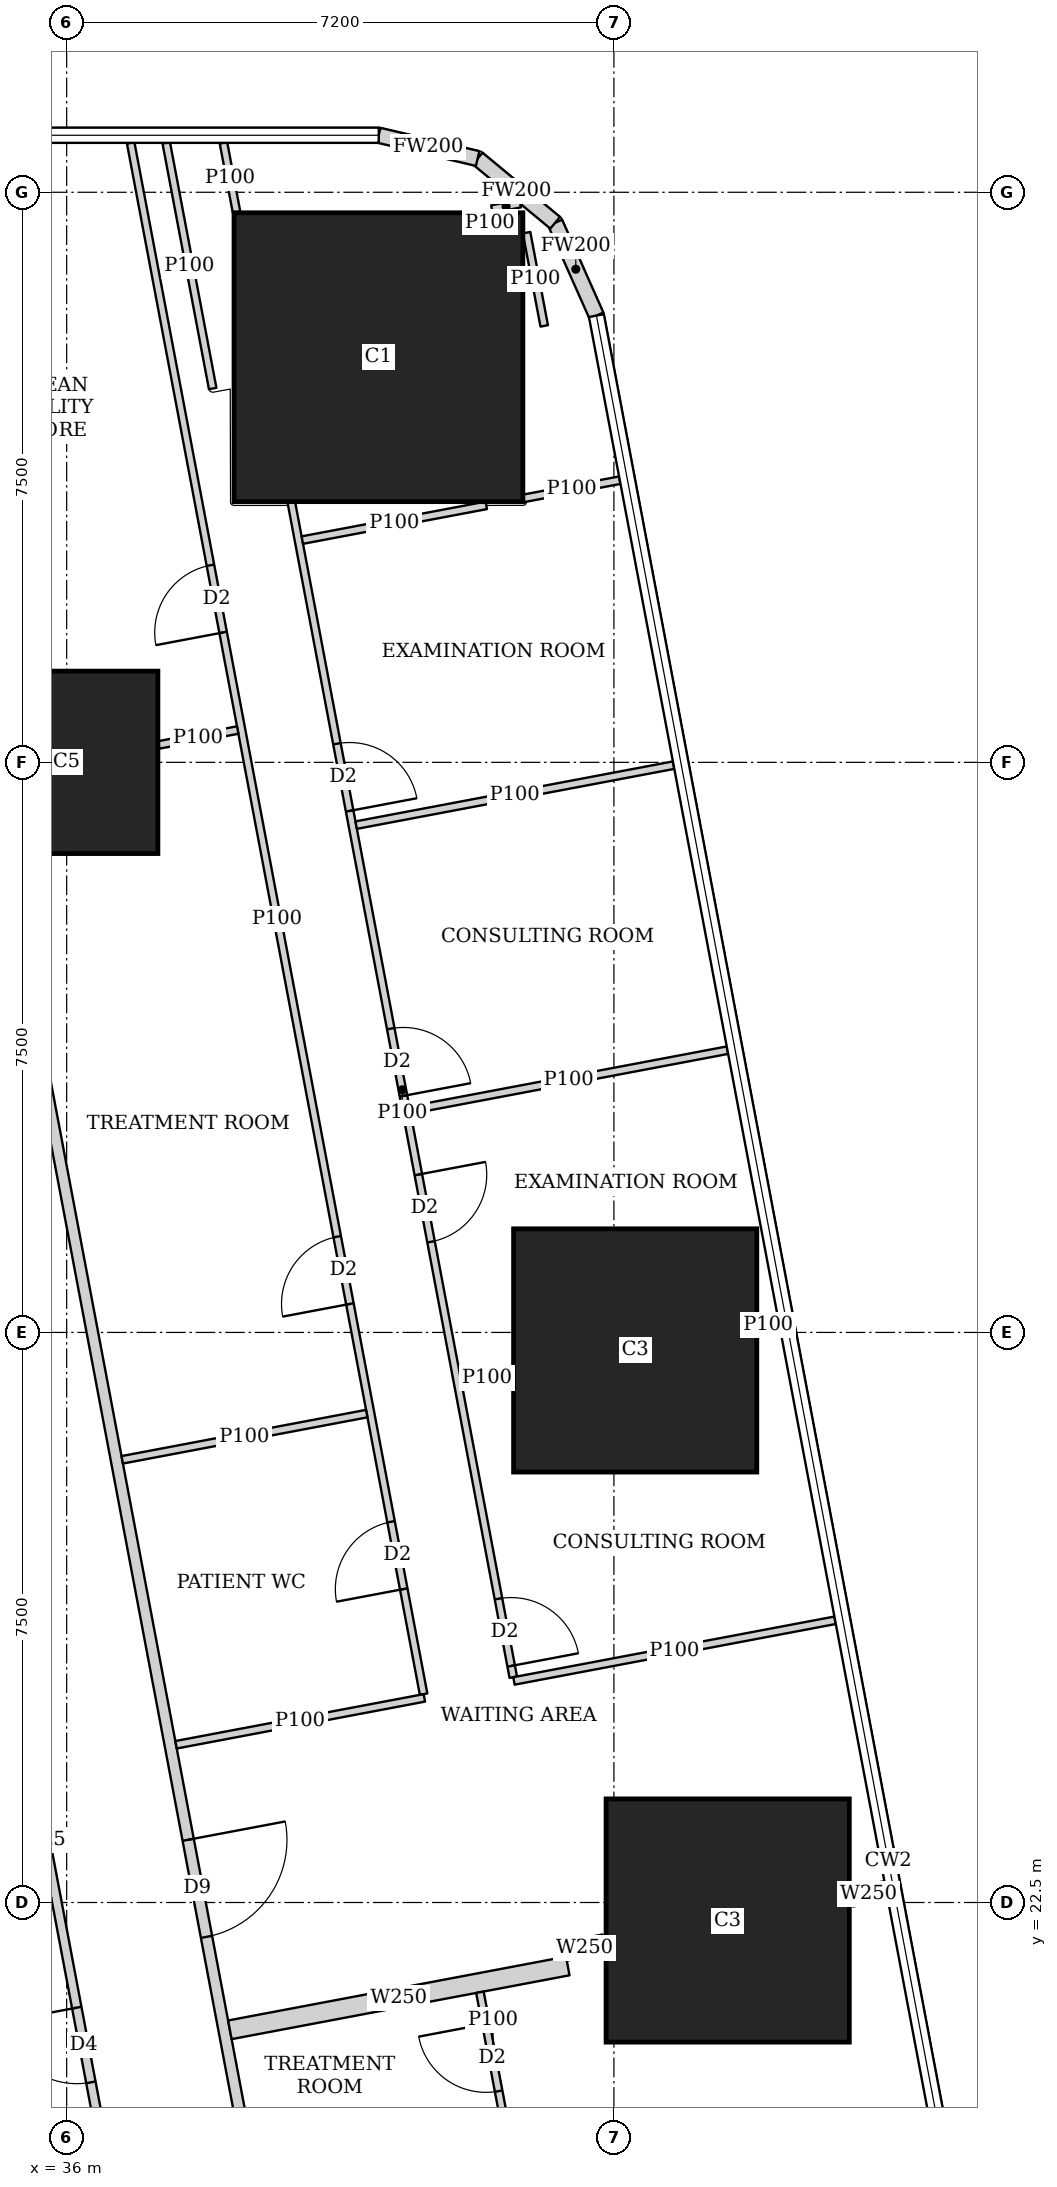
"""IFC4 building model, lengths in metres.
Left out: names, types, materials, properties, quantities, classifications, styles, units other than length and angle.
Written with IfcOpenShell. Run it as: python <this file> out.ifc"""

import sys

from ifc_helpers import new_model, si_unit, direction, frame, frame_2d, origin, origin_2d, place, context, subcontext, project, spatial, rectangle, extrude, element, fill, save


model = new_model("IFC4")
c1 = context("Model", 3, precision=1e-05, world=origin(), true_north=direction((0.0, 1.0)))
c2 = subcontext(c1, "Body", "Model", "MODEL_VIEW")
j1 = project(units=[si_unit("LENGTHUNIT", "METRE"), si_unit("PLANEANGLEUNIT", "RADIAN")], contexts=[c1])
p1 = place(None, origin())
s1 = spatial("IfcSite", under=j1, at=p1, CompositionType="ELEMENT")
p2 = place(p1, origin())
s2 = spatial("IfcBuilding", under=s1, at=p2, CompositionType="ELEMENT")
p3 = place(p2, frame((0.0, 0.0, 5.6)))
s3 = spatial("IfcBuildingStorey", under=s2, at=p3, CompositionType="ELEMENT", Elevation=5.6)
for number, where, z_axis, x_axis in (
    (1, (44.697, 22.263, 0.0), (0.0, 0.0, 1.0), (1.0, 0.0, 0.0)),
    (2, (43.48, 29.763, 0.0), (0.0, 0.0, 1.0), (1.0, 0.0, 0.0)),
):
    element("IfcColumn", number, at=place(p3, frame(where, z_axis=z_axis, x_axis=x_axis)), inside=s3, PredefinedType="COLUMN", context=c2, shape_type="SweptSolid", body=[
        extrude(rectangle(XDim=3.2, YDim=3.2, at=origin_2d()), origin(), (0.0, 0.0, 1.0), 4.5),
    ])
p4 = place(p3, frame((36.0, 37.5, 0.0), z_axis=(0.0, 0.0, 1.0), x_axis=(1.0, 0.0, 0.0)))
e3 = element("IfcColumn", 3, at=p4, inside=s3, PredefinedType="COLUMN", context=c2, shape_type="SweptSolid", body=[
    extrude(rectangle(XDim=2.4, YDim=2.4, at=origin_2d()), origin(), (0.0, 0.0, 1.0), 4.5),
])
p5 = place(p3, frame((40.102, 42.83, 0.0), z_axis=(0.0, 0.0, 1.0), x_axis=(1.0, 0.0, 0.0)))
e4 = element("IfcColumn", 4, at=p5, inside=s3, PredefinedType="COLUMN", context=c2, shape_type="SweptSolid", body=[
    extrude(rectangle(XDim=3.8, YDim=3.8, at=origin_2d()), origin(), (0.0, 0.0, 1.0), 4.5),
])
p6 = place(p3, frame((42.97, 43.377, 0.0), z_axis=(0.0, 0.0, 1.0), x_axis=(-0.406002956633, 0.913871762998, 0.0)))
e5 = element("IfcWall", 5, at=p6, inside=s3, PredefinedType="SOLIDWALL", context=c2, shape_type="SweptSolid", body=[
    extrude(rectangle(XDim=1.337, YDim=0.2, at=frame_2d((0.669, 0.0))), origin(), (0.0, 0.0, 1.0), 4.2),
])
p7 = place(p3, frame((42.427, 44.599, 0.0), z_axis=(0.0, 0.0, 1.0), x_axis=(-0.770091412544, 0.637933551655, 0.0)))
e6 = element("IfcWall", 6, at=p7, inside=s3, PredefinedType="SOLIDWALL", context=c2, shape_type="SweptSolid", body=[
    extrude(rectangle(XDim=1.324, YDim=0.2, at=frame_2d((0.662, 0.0))), origin(), (0.0, 0.0, 1.0), 4.2),
])
p8 = place(p3, frame((41.407, 45.444, 0.0), z_axis=(0.0, 0.0, 1.0), x_axis=(-0.973453091607, 0.228886606077, 0.0)))
e7 = element("IfcWall", 7, at=p8, inside=s3, PredefinedType="SOLIDWALL", context=c2, shape_type="SweptSolid", body=[
    extrude(rectangle(XDim=1.336, YDim=0.2, at=frame_2d((0.668, 0.0))), origin(), (0.0, 0.0, 1.0), 4.2),
])
p9 = place(p3, frame((35.151, 36.285, 0.0), z_axis=(0.0, 0.0, 1.0), x_axis=(0.18558085056, -0.982628998099, 0.0)))
e8 = element("IfcWall", 8, at=p9, inside=s3, PredefinedType="SOLIDWALL", context=c2, shape_type="SweptSolid", body=[
    extrude(rectangle(XDim=34.352, YDim=0.15, at=frame_2d((17.176, 0.0))), origin(), (0.0, 0.0, 1.0), 2.4),
])
p10 = place(p9, frame((13.189, 0.0, 0.0)))
e9 = element("IfcOpeningElement", 9, at=p10, cuts=e8, PredefinedType="OPENING", context=c2, shape_type="SweptSolid", body=[
    extrude(rectangle(XDim=1.3, YDim=2.1, at=frame_2d((0.65, 1.05))), frame((0.0, 0.085, 0.0), z_axis=(0.0, -1.0, 0.0), x_axis=(1.0, 0.0, 0.0)), (0.0, 0.0, 1.0), 0.17),
])
p11 = place(p9, frame((19.443, 0.0, 0.0)))
e10 = element("IfcOpeningElement", 10, at=p11, cuts=e8, PredefinedType="OPENING", context=c2, shape_type="SweptSolid", body=[
    extrude(rectangle(XDim=1.3, YDim=2.1, at=frame_2d((0.65, 1.05))), frame((0.0, 0.085, 0.0), z_axis=(0.0, -1.0, 0.0), x_axis=(1.0, 0.0, 0.0)), (0.0, 0.0, 1.0), 0.17),
])
p12 = place(p9, frame((25.444, 0.0, 0.0)))
e11 = element("IfcOpeningElement", 11, at=p12, cuts=e8, PredefinedType="OPENING", context=c2, shape_type="SweptSolid", body=[
    extrude(rectangle(XDim=1.3, YDim=2.1, at=frame_2d((0.65, 1.05))), frame((0.0, 0.085, 0.0), z_axis=(0.0, -1.0, 0.0), x_axis=(1.0, 0.0, 0.0)), (0.0, 0.0, 1.0), 0.17),
])
p13 = place(p3, frame((37.921, 42.418, 0.0), z_axis=(0.0, 0.0, 1.0), x_axis=(-0.185713480744, 0.982603940085, 0.0)))
e12 = element("IfcWall", 12, at=p13, inside=s3, PredefinedType="PARTITIONING", context=c2, shape_type="SweptSolid", body=[
    extrude(rectangle(XDim=3.289, YDim=0.1, at=frame_2d((1.645, 0.0))), origin(), (0.0, 0.0, 1.0), 2.4),
])
p14 = place(p3, frame((42.051, 44.469, 0.0), z_axis=(0.0, 0.0, 1.0), x_axis=(0.185728424166, -0.98260111564, 0.0)))
e13 = element("IfcWall", 13, at=p14, inside=s3, PredefinedType="PARTITIONING", context=c2, shape_type="SweptSolid", body=[
    extrude(rectangle(XDim=1.249, YDim=0.1, at=frame_2d((0.625, 0.0))), origin(), (0.0, 0.0, 1.0), 4.2),
])
p15 = place(p3, frame((38.063, 45.65, 0.0), z_axis=(0.0, 0.0, 1.0), x_axis=(0.185288147753, -0.982684233262, 0.0)))
e14 = element("IfcWall", 14, at=p15, inside=s3, PredefinedType="PARTITIONING", context=c2, shape_type="SweptSolid", body=[
    extrude(rectangle(XDim=0.929, YDim=0.1, at=frame_2d((0.464, 0.0))), origin(), (0.0, 0.0, 1.0), 4.2),
])
p16 = place(p3, frame((38.956, 40.92, 0.0), z_axis=(0.0, 0.0, 1.0), x_axis=(0.185636914727, -0.982618408077, 0.0)))
e15 = element("IfcWall", 15, at=p16, inside=s3, PredefinedType="PARTITIONING", context=c2, shape_type="SweptSolid", body=[
    extrude(rectangle(XDim=15.729, YDim=0.1, at=frame_2d((7.865, 0.0))), origin(), (0.0, 0.0, 1.0), 2.6),
])
p17 = place(p16, frame((14.679, 0.0, 0.0)))
e16 = element("IfcOpeningElement", 16, at=p17, cuts=e15, PredefinedType="OPENING", context=c2, shape_type="SweptSolid", body=[
    extrude(rectangle(XDim=0.9, YDim=2.1, at=frame_2d((0.45, 1.05))), frame((0.0, 0.06, 0.0), z_axis=(0.0, -1.0, 0.0), x_axis=(1.0, 0.0, 0.0)), (0.0, 0.0, 1.0), 0.12),
])
p18 = place(p16, frame((9.0, 0.0, 0.0)))
e17 = element("IfcOpeningElement", 17, at=p18, cuts=e15, PredefinedType="OPENING", context=c2, shape_type="SweptSolid", body=[
    extrude(rectangle(XDim=0.9, YDim=2.1, at=frame_2d((0.45, 1.05))), frame((0.0, 0.06, 0.0), z_axis=(0.0, -1.0, 0.0), x_axis=(1.0, 0.0, 0.0)), (0.0, 0.0, 1.0), 0.12),
])
p19 = place(p16, frame((7.046, 0.0, 0.0)))
e18 = element("IfcOpeningElement", 18, at=p19, cuts=e15, PredefinedType="OPENING", context=c2, shape_type="SweptSolid", body=[
    extrude(rectangle(XDim=0.9, YDim=2.1, at=frame_2d((0.45, 1.05))), frame((0.0, 0.06, 0.0), z_axis=(0.0, -1.0, 0.0), x_axis=(1.0, 0.0, 0.0)), (0.0, 0.0, 1.0), 0.12),
])
p20 = place(p16, frame((3.231, 0.0, 0.0)))
e19 = element("IfcOpeningElement", 19, at=p20, cuts=e15, PredefinedType="OPENING", context=c2, shape_type="SweptSolid", body=[
    extrude(rectangle(XDim=0.9, YDim=2.1, at=frame_2d((0.45, 1.05))), frame((0.0, 0.06, 0.0), z_axis=(0.0, -1.0, 0.0), x_axis=(1.0, 0.0, 0.0)), (0.0, 0.0, 1.0), 0.12),
])
p21 = place(p3, frame((36.842, 45.65, 0.0), z_axis=(0.0, 0.0, 1.0), x_axis=(0.185559483963, -0.982633033188, 0.0)))
e20 = element("IfcWall", 20, at=p21, inside=s3, PredefinedType="PARTITIONING", context=c2, shape_type="SweptSolid", body=[
    extrude(rectangle(XDim=20.77, YDim=0.1, at=frame_2d((10.385, 0.0))), origin(), (0.0, 0.0, 1.0), 2.4),
])
p22 = place(p21, frame((18.462, 0.0, 0.0)))
e21 = element("IfcOpeningElement", 21, at=p22, cuts=e20, PredefinedType="OPENING", context=c2, shape_type="SweptSolid", body=[
    extrude(rectangle(XDim=0.9, YDim=2.1, at=frame_2d((0.45, 1.05))), frame((0.0, 0.06, 0.0), z_axis=(0.0, -1.0, 0.0), x_axis=(1.0, 0.0, 0.0)), (0.0, 0.0, 1.0), 0.12),
])
p23 = place(p21, frame((14.645, 0.0, 0.0)))
e22 = element("IfcOpeningElement", 22, at=p23, cuts=e20, PredefinedType="OPENING", context=c2, shape_type="SweptSolid", body=[
    extrude(rectangle(XDim=0.9, YDim=2.1, at=frame_2d((0.45, 1.05))), frame((0.0, 0.06, 0.0), z_axis=(0.0, -1.0, 0.0), x_axis=(1.0, 0.0, 0.0)), (0.0, 0.0, 1.0), 0.12),
])
p24 = place(p21, frame((5.655, 0.0, 0.0)))
e23 = element("IfcOpeningElement", 23, at=p24, cuts=e20, PredefinedType="OPENING", context=c2, shape_type="SweptSolid", body=[
    extrude(rectangle(XDim=0.9, YDim=2.1, at=frame_2d((0.45, 1.05))), frame((0.0, 0.06, 0.0), z_axis=(0.0, -1.0, 0.0), x_axis=(1.0, 0.0, 0.0)), (0.0, 0.0, 1.0), 0.12),
])
p25 = place(p3, frame((41.968, 44.85, 0.0), z_axis=(0.0, 0.0, 1.0), x_axis=(-0.982433858219, -0.186611131032, 0.0)))
e24 = element("IfcWall", 24, at=p25, inside=s3, PredefinedType="PARTITIONING", context=c2, shape_type="SweptSolid", body=[
    extrude(rectangle(XDim=0.381, YDim=0.1, at=frame_2d((0.19, 0.0))), origin(), (0.0, 0.0, 1.0), 4.2),
])
p26 = place(p3, frame((43.277, 41.212, 0.0), z_axis=(0.0, 0.0, 1.0), x_axis=(-0.982617952949, -0.185639323801, 0.0)))
e25 = element("IfcWall", 25, at=p26, inside=s3, PredefinedType="PARTITIONING", context=c2, shape_type="SweptSolid", body=[
    extrude(rectangle(XDim=1.288, YDim=0.1, at=frame_2d((0.644, 0.0))), origin(), (0.0, 0.0, 1.0), 2.4),
])
p27 = place(p3, frame((41.521, 40.881, 0.0), z_axis=(0.0, 0.0, 1.0), x_axis=(-0.982628922785, -0.18558124934, 0.0)))
e26 = element("IfcWall", 26, at=p27, inside=s3, PredefinedType="PARTITIONING", context=c2, shape_type="SweptSolid", body=[
    extrude(rectangle(XDim=2.463, YDim=0.1, at=frame_2d((1.231, 0.0))), origin(), (0.0, 0.0, 1.0), 2.4),
])
p28 = place(p3, frame((43.985, 37.463, 0.0), z_axis=(0.0, 0.0, 1.0), x_axis=(-0.982623519589, -0.185609856287, 0.0)))
e27 = element("IfcWall", 27, at=p28, inside=s3, PredefinedType="PARTITIONING", context=c2, shape_type="SweptSolid", body=[
    extrude(rectangle(XDim=4.25, YDim=0.1, at=frame_2d((2.125, 0.0))), origin(), (0.0, 0.0, 1.0), 2.4),
])
p29 = place(p3, frame((44.693, 33.713, 0.0), z_axis=(0.0, 0.0, 1.0), x_axis=(-0.982615600536, -0.185651775062, 0.0)))
e28 = element("IfcWall", 28, at=p29, inside=s3, PredefinedType="PARTITIONING", context=c2, shape_type="SweptSolid", body=[
    extrude(rectangle(XDim=4.249, YDim=0.1, at=frame_2d((2.125, 0.0))), origin(), (0.0, 0.0, 1.0), 2.4),
])
p30 = place(p3, frame((45.372, 30.121, 0.0), z_axis=(0.0, 0.0, 1.0), x_axis=(-0.982804690287, -0.184648153933, 0.0)))
e29 = element("IfcWall", 29, at=p30, inside=s3, PredefinedType="PARTITIONING", context=c2, shape_type="SweptSolid", body=[
    extrude(rectangle(XDim=0.287, YDim=0.1, at=frame_2d((0.144, 0.0))), origin(), (0.0, 0.0, 1.0), 4.2),
])
p31 = place(p3, frame((41.87, 29.459, 0.0), z_axis=(0.0, 0.0, 1.0), x_axis=(-0.982722777639, -0.185083608972, 0.0)))
e30 = element("IfcWall", 30, at=p31, inside=s3, PredefinedType="PARTITIONING", context=c2, shape_type="SweptSolid", body=[
    extrude(rectangle(XDim=0.686, YDim=0.1, at=frame_2d((0.343, 0.0))), origin(), (0.0, 0.0, 1.0), 2.6),
])
p32 = place(p3, frame((46.11, 26.213, 0.0), z_axis=(0.0, 0.0, 1.0), x_axis=(-0.982633535512, -0.185556823879, 0.0)))
e31 = element("IfcWall", 31, at=p32, inside=s3, PredefinedType="PARTITIONING", context=c2, shape_type="SweptSolid", body=[
    extrude(rectangle(XDim=4.3, YDim=0.1, at=frame_2d((2.15, 0.0))), origin(), (0.0, 0.0, 1.0), 2.4),
])
p33 = place(p3, frame((38.25, 37.925, 0.0), z_axis=(0.0, 0.0, 1.0), x_axis=(-0.982694151031, -0.185235540676, 0.0)))
e32 = element("IfcWall", 32, at=p33, inside=s3, PredefinedType="PARTITIONING", context=c2, shape_type="SweptSolid", body=[
    extrude(rectangle(XDim=1.058, YDim=0.1, at=frame_2d((0.529, 0.0))), origin(), (0.0, 0.0, 1.0), 4.2),
])
p34 = place(p3, frame((39.948, 28.932, 0.0), z_axis=(0.0, 0.0, 1.0), x_axis=(-0.982610347627, -0.185679575441, 0.0)))
e33 = element("IfcWall", 33, at=p34, inside=s3, PredefinedType="PARTITIONING", context=c2, shape_type="SweptSolid", body=[
    extrude(rectangle(XDim=3.274, YDim=0.1, at=frame_2d((1.637, 0.0))), origin(), (0.0, 0.0, 1.0), 2.6),
])
p35 = place(p3, frame((40.706, 25.192, 0.0), z_axis=(0.0, 0.0, 1.0), x_axis=(-0.982633623707, -0.185556356831, 0.0)))
e34 = element("IfcWall", 34, at=p35, inside=s3, PredefinedType="PARTITIONING", context=c2, shape_type="SweptSolid", body=[
    extrude(rectangle(XDim=3.325, YDim=0.1, at=frame_2d((1.663, 0.0))), origin(), (0.0, 0.0, 1.0), 4.2),
])
p36 = place(p3, frame((41.437, 21.319, 0.0), z_axis=(0.0, 0.0, 1.0), x_axis=(0.186029078128, -0.982544239254, 0.0)))
e35 = element("IfcWall", 35, at=p36, inside=s3, PredefinedType="PARTITIONING", context=c2, shape_type="SweptSolid", body=[
    extrude(rectangle(XDim=1.854, YDim=0.1, at=frame_2d((0.927, 0.0))), origin(), (0.0, 0.0, 1.0), 4.2),
])
p37 = place(p36, frame((0.424, 0.0, 0.0)))
e36 = element("IfcOpeningElement", 36, at=p37, cuts=e35, PredefinedType="OPENING", context=c2, shape_type="SweptSolid", body=[
    extrude(rectangle(XDim=0.9, YDim=2.1, at=frame_2d((0.45, 1.05))), frame((0.0, 0.06, 0.0), z_axis=(0.0, -1.0, 0.0), x_axis=(1.0, 0.0, 0.0)), (0.0, 0.0, 1.0), 0.12),
])
p38 = place(p3, frame((46.782, 22.657, 0.0), z_axis=(0.0, 0.0, 1.0), x_axis=(-0.982683117999, -0.185294062504, 0.0)))
e37 = element("IfcWall", 37, at=p38, inside=s3, PredefinedType="SOLIDWALL", context=c2, shape_type="SweptSolid", body=[
    extrude(rectangle(XDim=0.469, YDim=0.25, at=frame_2d((0.234, 0.0))), origin(), (0.0, 0.0, 1.0), 2.4),
])
p39 = place(p3, frame((43.073, 21.956, 0.0), z_axis=(0.0, 0.0, 1.0), x_axis=(-0.982395465615, -0.18681313963, 0.0)))
e38 = element("IfcWall", 38, at=p39, inside=s3, PredefinedType="SOLIDWALL", context=c2, shape_type="SweptSolid", body=[
    extrude(rectangle(XDim=0.525, YDim=0.25, at=frame_2d((0.263, 0.0))), origin(), (0.0, 0.0, 1.0), 2.6),
])
p40 = place(p3, frame((42.593, 21.665, 0.0), z_axis=(0.0, 0.0, 1.0), x_axis=(-0.982612837616, -0.185666398014, 0.0)))
e39 = element("IfcWall", 39, at=p40, inside=s3, PredefinedType="SOLIDWALL", context=c2, shape_type="SweptSolid", body=[
    extrude(rectangle(XDim=4.525, YDim=0.25, at=frame_2d((2.262, 0.0))), origin(), (0.0, 0.0, 1.0), 2.6),
])
p41 = place(p3, frame((37.059, 16.213, 0.0), z_axis=(0.0, 0.0, 1.0), x_axis=(-0.185585225745, 0.982628171785, 0.0)))
e40 = element("IfcWall", 40, at=p41, inside=s3, PredefinedType="PARTITIONING", context=c2, shape_type="SweptSolid", body=[
    extrude(rectangle(XDim=15.072, YDim=0.125, at=frame_2d((7.536, 0.0))), origin(), (0.0, 0.0, 1.0), 2.6),
])
p42 = place(p41, frame((7.221, 0.0, 0.0)))
e41 = element("IfcOpeningElement", 41, at=p42, cuts=e40, PredefinedType="OPENING", context=c2, shape_type="SweptSolid", body=[
    extrude(rectangle(XDim=1.0, YDim=2.1, at=frame_2d((0.5, 1.05))), frame((0.0, 0.073, 0.0), z_axis=(0.0, -1.0, 0.0), x_axis=(1.0, 0.0, 0.0)), (0.0, 0.0, 1.0), 0.145),
])
p43 = place(p41, frame((0.25, 0.0, 0.0)))
e42 = element("IfcOpeningElement", 42, at=p43, cuts=e40, PredefinedType="OPENING", context=c2, shape_type="SweptSolid", body=[
    extrude(rectangle(XDim=1.0, YDim=2.1, at=frame_2d((0.5, 1.05))), frame((0.0, 0.073, 0.0), z_axis=(0.0, -1.0, 0.0), x_axis=(1.0, 0.0, 0.0)), (0.0, 0.0, 1.0), 0.145),
])
p44 = place(p41, frame((3.99, 0.0, 0.0)))
e43 = element("IfcOpeningElement", 43, at=p44, cuts=e40, PredefinedType="OPENING", context=c2, shape_type="SweptSolid", body=[
    extrude(rectangle(XDim=1.0, YDim=2.1, at=frame_2d((0.5, 1.05))), frame((0.0, 0.073, 0.0), z_axis=(0.0, -1.0, 0.0), x_axis=(1.0, 0.0, 0.0)), (0.0, 0.0, 1.0), 0.145),
])
p45 = place(p17, origin())
e44 = element("IfcDoor", 44, at=p45, inside=s3, OperationType="SINGLE_SWING_RIGHT", PredefinedType="DOOR", context=c2, shape_type="SweptSolid", body=[
    extrude(rectangle(XDim=0.9, YDim=2.1, at=frame_2d((0.45, 1.05))), frame((0.0, 0.025, 0.0), z_axis=(0.0, -1.0, 0.0), x_axis=(1.0, 0.0, 0.0)), (0.0, 0.0, 1.0), 0.05),
])
fill(e16, e44)
p46 = place(p18, origin())
e45 = element("IfcDoor", 45, at=p46, inside=s3, OperationType="SINGLE_SWING_LEFT", PredefinedType="DOOR", context=c2, shape_type="SweptSolid", body=[
    extrude(rectangle(XDim=0.9, YDim=2.1, at=frame_2d((0.45, 1.05))), frame((0.0, 0.025, 0.0), z_axis=(0.0, -1.0, 0.0), x_axis=(1.0, 0.0, 0.0)), (0.0, 0.0, 1.0), 0.05),
])
fill(e17, e45)
p47 = place(p19, origin())
e46 = element("IfcDoor", 46, at=p47, inside=s3, OperationType="SINGLE_SWING_RIGHT", PredefinedType="DOOR", context=c2, shape_type="SweptSolid", body=[
    extrude(rectangle(XDim=0.9, YDim=2.1, at=frame_2d((0.45, 1.05))), frame((0.0, 0.025, 0.0), z_axis=(0.0, -1.0, 0.0), x_axis=(1.0, 0.0, 0.0)), (0.0, 0.0, 1.0), 0.05),
])
fill(e18, e46)
p48 = place(p20, origin())
e47 = element("IfcDoor", 47, at=p48, inside=s3, OperationType="SINGLE_SWING_RIGHT", PredefinedType="DOOR", context=c2, shape_type="SweptSolid", body=[
    extrude(rectangle(XDim=0.9, YDim=2.1, at=frame_2d((0.45, 1.05))), frame((0.0, 0.025, 0.0), z_axis=(0.0, -1.0, 0.0), x_axis=(1.0, 0.0, 0.0)), (0.0, 0.0, 1.0), 0.05),
])
fill(e19, e47)
p49 = place(p22, origin())
e48 = element("IfcDoor", 48, at=p49, inside=s3, OperationType="SINGLE_SWING_LEFT", PredefinedType="DOOR", context=c2, shape_type="SweptSolid", body=[
    extrude(rectangle(XDim=0.9, YDim=2.1, at=frame_2d((0.45, 1.05))), frame((0.0, 0.025, 0.0), z_axis=(0.0, -1.0, 0.0), x_axis=(1.0, 0.0, 0.0)), (0.0, 0.0, 1.0), 0.05),
])
fill(e21, e48)
p50 = place(p23, origin())
e49 = element("IfcDoor", 49, at=p50, inside=s3, OperationType="SINGLE_SWING_LEFT", PredefinedType="DOOR", context=c2, shape_type="SweptSolid", body=[
    extrude(rectangle(XDim=0.9, YDim=2.1, at=frame_2d((0.45, 1.05))), frame((0.0, 0.025, 0.0), z_axis=(0.0, -1.0, 0.0), x_axis=(1.0, 0.0, 0.0)), (0.0, 0.0, 1.0), 0.05),
])
fill(e22, e49)
p51 = place(p24, origin())
e50 = element("IfcDoor", 50, at=p51, inside=s3, OperationType="SINGLE_SWING_LEFT", PredefinedType="DOOR", context=c2, shape_type="SweptSolid", body=[
    extrude(rectangle(XDim=0.9, YDim=2.1, at=frame_2d((0.45, 1.05))), frame((0.0, 0.025, 0.0), z_axis=(0.0, -1.0, 0.0), x_axis=(1.0, 0.0, 0.0)), (0.0, 0.0, 1.0), 0.05),
])
fill(e23, e50)
p52 = place(p10, origin())
e51 = element("IfcDoor", 51, at=p52, inside=s3, OperationType="DOUBLE_DOOR_SINGLE_SWING", PredefinedType="DOOR", context=c2, shape_type="SweptSolid", body=[
    extrude(rectangle(XDim=1.3, YDim=2.1, at=frame_2d((0.65, 1.05))), frame((0.0, 0.025, 0.0), z_axis=(0.0, -1.0, 0.0), x_axis=(1.0, 0.0, 0.0)), (0.0, 0.0, 1.0), 0.05),
])
fill(e9, e51)
p53 = place(p37, origin())
e52 = element("IfcDoor", 52, at=p53, inside=s3, OperationType="SINGLE_SWING_RIGHT", PredefinedType="DOOR", context=c2, shape_type="SweptSolid", body=[
    extrude(rectangle(XDim=0.9, YDim=2.1, at=frame_2d((0.45, 1.05))), frame((0.0, 0.025, 0.0), z_axis=(0.0, -1.0, 0.0), x_axis=(1.0, 0.0, 0.0)), (0.0, 0.0, 1.0), 0.05),
])
fill(e36, e52)
p54 = place(p44, origin())
e53 = element("IfcDoor", 53, at=p54, inside=s3, OperationType="SINGLE_SWING_RIGHT", PredefinedType="DOOR", context=c2, shape_type="SweptSolid", body=[
    extrude(rectangle(XDim=1.0, YDim=2.1, at=frame_2d((0.5, 1.05))), frame((0.0, 0.025, 0.0), z_axis=(0.0, -1.0, 0.0), x_axis=(1.0, 0.0, 0.0)), (0.0, 0.0, 1.0), 0.05),
])
fill(e43, e53)
save(model, sys.argv[1])
